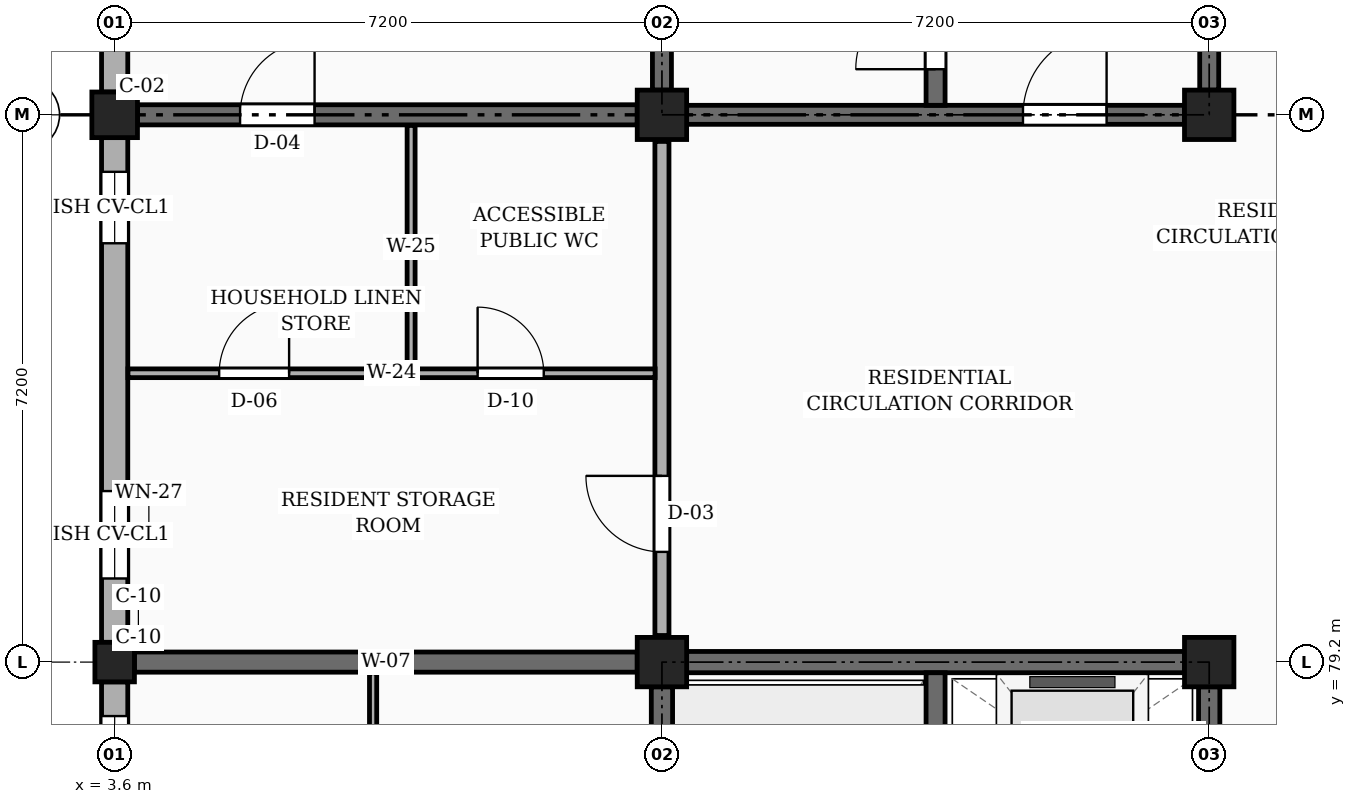
"""IFC4 building model, lengths in metres.
Left out: names, types, materials, properties, quantities, classifications, styles, units other than length and angle.
Written with IfcOpenShell. Run it as: python <this file> out.ifc"""

import sys

from ifc_helpers import new_model, si_unit, direction, frame, frame_2d, origin, origin_2d, place, context, subcontext, project, spatial, rectangle, circle, extrude, element, fill, save


model = new_model("IFC4")
c1 = context("Model", 3, precision=1e-05, world=origin(), true_north=direction((0.0, 1.0)))
c2 = subcontext(c1, "Body", "Model", "MODEL_VIEW")
j1 = project(units=[si_unit("LENGTHUNIT", "METRE"), si_unit("PLANEANGLEUNIT", "RADIAN")], contexts=[c1])
p1 = place(None, origin())
s1 = spatial("IfcSite", under=j1, at=p1, CompositionType="ELEMENT")
p2 = place(p1, origin())
s2 = spatial("IfcBuilding", under=s1, at=p2, CompositionType="ELEMENT")
p3 = place(p2, origin())
s3 = spatial("IfcBuildingStorey", under=s2, at=p3, CompositionType="ELEMENT", Elevation=0.0)
p4 = place(p3, frame((3.6, 79.2, 0.0), z_axis=(0.0, 0.0, 1.0), x_axis=(1.0, 0.0, 0.0)))
e1 = element("IfcColumn", 1, at=p4, inside=s3, PredefinedType="COLUMN", context=c2, shape_type="SweptSolid", body=[
    extrude(circle(Radius=0.26, at=origin_2d()), origin(), (0.0, 0.0, 1.0), 4.5),
])
p5 = place(p3, frame((3.6, 86.4, 0.0), z_axis=(0.0, 0.0, 1.0), x_axis=(1.0, 0.0, 0.0)))
e2 = element("IfcColumn", 2, at=p5, inside=s3, PredefinedType="COLUMN", context=c2, shape_type="SweptSolid", body=[
    extrude(rectangle(XDim=0.6, YDim=0.6, at=origin_2d()), origin(), (0.0, 0.0, 1.0), 4.5),
])
for number, where, z_axis, x_axis in (
    (3, (10.8, 79.2, 0.0), (0.0, 0.0, 1.0), (1.0, 0.0, 0.0)),
    (4, (10.8, 86.4, 0.0), (0.0, 0.0, 1.0), (1.0, 0.0, 0.0)),
    (5, (18.0, 79.2, 0.0), (0.0, 0.0, 1.0), (1.0, 0.0, 0.0)),
    (6, (18.0, 86.4, 0.0), (0.0, 0.0, 1.0), (1.0, 0.0, 0.0)),
):
    element("IfcColumn", number, at=place(p3, frame(where, z_axis=z_axis, x_axis=x_axis)), inside=s3, PredefinedType="COLUMN", context=c2, shape_type="SweptSolid", body=[
        extrude(rectangle(XDim=0.65, YDim=0.65, at=origin_2d()), origin(), (0.0, 0.0, 1.0), 4.5),
    ])
p6 = place(p3, frame((3.86, 79.2, 0.0), z_axis=(0.0, 0.0, 1.0), x_axis=(1.0, 0.0, 0.0)))
e7 = element("IfcWall", 7, at=p6, inside=s3, PredefinedType="SOLIDWALL", context=c2, shape_type="SweptSolid", body=[
    extrude(rectangle(XDim=6.615, YDim=0.265, at=frame_2d((3.308, 0.0))), origin(), (0.0, 0.0, 1.0), 3.56),
])
p7 = place(p3, frame((3.9, 86.4, 0.0), z_axis=(0.0, 0.0, 1.0), x_axis=(1.0, 0.0, 0.0)))
e8 = element("IfcWall", 8, at=p7, inside=s3, PredefinedType="SOLIDWALL", context=c2, shape_type="SweptSolid", body=[
    extrude(rectangle(XDim=6.575, YDim=0.265, at=frame_2d((3.288, 0.0))), origin(), (0.0, 0.0, 1.0), 3.56),
])
p8 = place(p7, frame((1.35, 0.0, 0.0)))
e9 = element("IfcOpeningElement", 9, at=p8, cuts=e8, PredefinedType="OPENING", context=c2, shape_type="SweptSolid", body=[
    extrude(rectangle(XDim=0.98, YDim=2.12, at=frame_2d((0.49, 1.06))), frame((0.0, 0.143, 0.0), z_axis=(0.0, -1.0, 0.0), x_axis=(1.0, 0.0, 0.0)), (0.0, 0.0, 1.0), 0.285),
])
p9 = place(p3, frame((3.6, 93.3, 0.0), z_axis=(0.0, 0.0, 1.0), x_axis=(0.0, -1.0, 0.0)))
e10 = element("IfcWall", 10, at=p9, inside=s3, PredefinedType="SOLIDWALL", context=c2, shape_type="SweptSolid", body=[
    extrude(rectangle(XDim=6.6, YDim=0.345, at=frame_2d((3.3, 0.0))), origin(), (0.0, 0.0, 1.0), 3.83),
])
p10 = place(p9, frame((0.45, 0.0, 0.78)))
e11 = element("IfcOpeningElement", 11, at=p10, cuts=e10, PredefinedType="OPENING", context=c2, shape_type="SweptSolid", body=[
    extrude(rectangle(XDim=1.38, YDim=1.36, at=frame_2d((0.69, 0.68))), frame((0.0, 0.183, 0.0), z_axis=(0.0, -1.0, 0.0), x_axis=(1.0, 0.0, 0.0)), (0.0, 0.0, 1.0), 0.365),
])
p11 = place(p9, frame((4.65, 0.0, 0.78)))
e12 = element("IfcOpeningElement", 12, at=p11, cuts=e10, PredefinedType="OPENING", context=c2, shape_type="SweptSolid", body=[
    extrude(rectangle(XDim=0.94, YDim=1.44, at=frame_2d((0.47, 0.72))), frame((0.0, 0.183, 0.0), z_axis=(0.0, -1.0, 0.0), x_axis=(1.0, 0.0, 0.0)), (0.0, 0.0, 1.0), 0.365),
])
p12 = place(p3, frame((3.6, 86.1, 0.0), z_axis=(0.0, 0.0, 1.0), x_axis=(0.0, -1.0, 0.0)))
e13 = element("IfcWall", 13, at=p12, inside=s3, PredefinedType="SOLIDWALL", context=c2, shape_type="SweptSolid", body=[
    extrude(rectangle(XDim=6.64, YDim=0.345, at=frame_2d((3.32, 0.0))), origin(), (0.0, 0.0, 1.0), 3.83),
])
p13 = place(p12, frame((0.45, 0.0, 0.78)))
e14 = element("IfcOpeningElement", 14, at=p13, cuts=e13, PredefinedType="OPENING", context=c2, shape_type="SweptSolid", body=[
    extrude(rectangle(XDim=0.94, YDim=1.44, at=frame_2d((0.47, 0.72))), frame((0.0, 0.183, 0.0), z_axis=(0.0, -1.0, 0.0), x_axis=(1.0, 0.0, 0.0)), (0.0, 0.0, 1.0), 0.365),
])
p14 = place(p12, frame((4.65, 0.0, 0.78)))
e15 = element("IfcOpeningElement", 15, at=p14, cuts=e13, PredefinedType="OPENING", context=c2, shape_type="SweptSolid", body=[
    extrude(rectangle(XDim=1.15, YDim=1.44, at=frame_2d((0.575, 0.72))), frame((0.0, 0.183, 0.0), z_axis=(0.0, -1.0, 0.0), x_axis=(1.0, 0.0, 0.0)), (0.0, 0.0, 1.0), 0.365),
])
p15 = place(p3, frame((3.6, 78.94, 0.0), z_axis=(0.0, 0.0, 1.0), x_axis=(0.0, -1.0, 0.0)))
e16 = element("IfcWall", 16, at=p15, inside=s3, PredefinedType="SOLIDWALL", context=c2, shape_type="SweptSolid", body=[
    extrude(rectangle(XDim=6.64, YDim=0.345, at=frame_2d((3.32, 0.0))), origin(), (0.0, 0.0, 1.0), 3.83),
])
p16 = place(p15, frame((0.45, 0.0, 0.78)))
e17 = element("IfcOpeningElement", 17, at=p16, cuts=e16, PredefinedType="OPENING", context=c2, shape_type="SweptSolid", body=[
    extrude(rectangle(XDim=1.15, YDim=1.44, at=frame_2d((0.575, 0.72))), frame((0.0, 0.183, 0.0), z_axis=(0.0, -1.0, 0.0), x_axis=(1.0, 0.0, 0.0)), (0.0, 0.0, 1.0), 0.365),
])
p17 = place(p15, frame((4.65, 0.0, 0.78)))
e18 = element("IfcOpeningElement", 18, at=p17, cuts=e16, PredefinedType="OPENING", context=c2, shape_type="SweptSolid", body=[
    extrude(rectangle(XDim=1.35, YDim=1.44, at=frame_2d((0.675, 0.72))), frame((0.0, 0.183, 0.0), z_axis=(0.0, -1.0, 0.0), x_axis=(1.0, 0.0, 0.0)), (0.0, 0.0, 1.0), 0.365),
])
for number, where, z_axis, x_axis in (
    (19, (10.8, 72.325, 0.0), (0.0, 0.0, 1.0), (0.0, 1.0, 0.0)),
    (20, (11.125, 79.2, 0.0), (0.0, 0.0, 1.0), (1.0, 0.0, 0.0)),
):
    element("IfcWall", number, at=place(p3, frame(where, z_axis=z_axis, x_axis=x_axis)), inside=s3, PredefinedType="SHEAR", context=c2, shape_type="SweptSolid", body=[
        extrude(rectangle(XDim=6.55, YDim=0.28, at=frame_2d((3.275, 0.0))), origin(), (0.0, 0.0, 1.0), 4.26),
    ])
p18 = place(p3, frame((18.0, 72.325, 0.0), z_axis=(0.0, 0.0, 1.0), x_axis=(0.0, 1.0, 0.0)))
e21 = element("IfcWall", 21, at=p18, inside=s3, PredefinedType="SHEAR", context=c2, shape_type="SweptSolid", body=[
    extrude(rectangle(XDim=6.55, YDim=0.28, at=frame_2d((3.275, 0.0))), origin(), (0.0, 0.0, 1.0), 4.26),
])
p19 = place(p18, frame((1.5, 0.0, 0.0)))
e22 = element("IfcOpeningElement", 22, at=p19, cuts=e21, PredefinedType="OPENING", context=c2, shape_type="SweptSolid", body=[
    extrude(rectangle(XDim=1.1, YDim=2.15, at=frame_2d((0.55, 1.075))), frame((0.0, 0.15, 0.0), z_axis=(0.0, -1.0, 0.0), x_axis=(1.0, 0.0, 0.0)), (0.0, 0.0, 1.0), 0.3),
])
p20 = place(p3, frame((14.4, 72.14, 0.0), z_axis=(0.0, 0.0, 1.0), x_axis=(0.0, 1.0, 0.0)))
e23 = element("IfcWall", 23, at=p20, inside=s3, PredefinedType="SHEAR", context=c2, shape_type="SweptSolid", body=[
    extrude(rectangle(XDim=6.92, YDim=0.25, at=frame_2d((3.46, 0.0))), origin(), (0.0, 0.0, 1.0), 4.26),
])
p21 = place(p20, frame((0.46, 0.0, 0.0)))
e24 = element("IfcOpeningElement", 24, at=p21, cuts=e23, PredefinedType="OPENING", context=c2, shape_type="SweptSolid", body=[
    extrude(rectangle(XDim=1.05, YDim=2.15, at=frame_2d((0.525, 1.075))), frame((0.0, 0.135, 0.0), z_axis=(0.0, -1.0, 0.0), x_axis=(1.0, 0.0, 0.0)), (0.0, 0.0, 1.0), 0.27),
])
p22 = place(p3, frame((10.8, 86.725, 0.0), z_axis=(0.0, 0.0, 1.0), x_axis=(0.0, 1.0, 0.0)))
e25 = element("IfcWall", 25, at=p22, inside=s3, PredefinedType="SHEAR", context=c2, shape_type="SweptSolid", body=[
    extrude(rectangle(XDim=6.55, YDim=0.25, at=frame_2d((3.275, 0.0))), origin(), (0.0, 0.0, 1.0), 4.26),
])
p23 = place(p3, frame((18.0, 86.725, 0.0), z_axis=(0.0, 0.0, 1.0), x_axis=(0.0, 1.0, 0.0)))
e26 = element("IfcWall", 26, at=p23, inside=s3, PredefinedType="SHEAR", context=c2, shape_type="SweptSolid", body=[
    extrude(rectangle(XDim=6.55, YDim=0.25, at=frame_2d((3.275, 0.0))), origin(), (0.0, 0.0, 1.0), 4.26),
])
p24 = place(p23, frame((1.5, 0.0, 0.0)))
e27 = element("IfcOpeningElement", 27, at=p24, cuts=e26, PredefinedType="OPENING", context=c2, shape_type="SweptSolid", body=[
    extrude(rectangle(XDim=1.1, YDim=2.15, at=frame_2d((0.55, 1.075))), frame((0.0, 0.135, 0.0), z_axis=(0.0, -1.0, 0.0), x_axis=(1.0, 0.0, 0.0)), (0.0, 0.0, 1.0), 0.27),
])
p25 = place(p3, frame((11.125, 86.4, 0.0), z_axis=(0.0, 0.0, 1.0), x_axis=(1.0, 0.0, 0.0)))
e28 = element("IfcWall", 28, at=p25, inside=s3, PredefinedType="SHEAR", context=c2, shape_type="SweptSolid", body=[
    extrude(rectangle(XDim=6.55, YDim=0.25, at=frame_2d((3.275, 0.0))), origin(), (0.0, 0.0, 1.0), 4.26),
])
p26 = place(p25, frame((4.425, 0.0, 0.0)))
e29 = element("IfcOpeningElement", 29, at=p26, cuts=e28, PredefinedType="OPENING", context=c2, shape_type="SweptSolid", body=[
    extrude(rectangle(XDim=1.1, YDim=2.15, at=frame_2d((0.55, 1.075))), frame((0.0, 0.135, 0.0), z_axis=(0.0, -1.0, 0.0), x_axis=(1.0, 0.0, 0.0)), (0.0, 0.0, 1.0), 0.27),
])
p27 = place(p3, frame((14.4, 86.525, 0.0), z_axis=(0.0, 0.0, 1.0), x_axis=(0.0, 1.0, 0.0)))
e30 = element("IfcWall", 30, at=p27, inside=s3, PredefinedType="SHEAR", context=c2, shape_type="SweptSolid", body=[
    extrude(rectangle(XDim=6.95, YDim=0.25, at=frame_2d((3.475, 0.0))), origin(), (0.0, 0.0, 1.0), 4.26),
])
p28 = place(p27, frame((0.475, 0.0, 0.0)))
e31 = element("IfcOpeningElement", 31, at=p28, cuts=e30, PredefinedType="OPENING", context=c2, shape_type="SweptSolid", body=[
    extrude(rectangle(XDim=1.05, YDim=2.15, at=frame_2d((0.525, 1.075))), frame((0.0, 0.135, 0.0), z_axis=(0.0, -1.0, 0.0), x_axis=(1.0, 0.0, 0.0)), (0.0, 0.0, 1.0), 0.27),
])
p29 = place(p3, frame((10.8, 79.55, 0.0), z_axis=(0.0, 0.0, 1.0), x_axis=(0.0, 1.0, 0.0)))
e32 = element("IfcWall", 32, at=p29, inside=s3, PredefinedType="PARTITIONING", context=c2, shape_type="SweptSolid", body=[
    extrude(rectangle(XDim=6.5, YDim=0.185, at=frame_2d((3.25, 0.0))), origin(), (0.0, 0.0, 1.0), 3.51),
])
p30 = place(p29, frame((1.1, 0.0, 0.0)))
e33 = element("IfcOpeningElement", 33, at=p30, cuts=e32, PredefinedType="OPENING", context=c2, shape_type="SweptSolid", body=[
    extrude(rectangle(XDim=1.0, YDim=2.15, at=frame_2d((0.5, 1.075))), frame((0.0, 0.103, 0.0), z_axis=(0.0, -1.0, 0.0), x_axis=(1.0, 0.0, 0.0)), (0.0, 0.0, 1.0), 0.205),
])
p31 = place(p3, frame((7.0, 75.37, 0.0), z_axis=(0.0, 0.0, 1.0), x_axis=(0.0, 1.0, 0.0)))
e34 = element("IfcWall", 34, at=p31, inside=s3, PredefinedType="PARTITIONING", context=c2, shape_type="SweptSolid", body=[
    extrude(rectangle(XDim=3.69, YDim=0.095, at=frame_2d((1.845, 0.0))), origin(), (0.0, 0.0, 1.0), 3.695),
])
p32 = place(p3, frame((3.775, 83.0, 0.0), z_axis=(0.0, 0.0, 1.0), x_axis=(1.0, 0.0, 0.0)))
e35 = element("IfcWall", 35, at=p32, inside=s3, PredefinedType="PARTITIONING", context=c2, shape_type="SweptSolid", body=[
    extrude(rectangle(XDim=6.935, YDim=0.115, at=frame_2d((3.468, 0.0))), origin(), (0.0, 0.0, 1.0), 3.695),
])
p33 = place(p32, frame((4.6, 0.0, 0.0)))
e36 = element("IfcOpeningElement", 36, at=p33, cuts=e35, PredefinedType="OPENING", context=c2, shape_type="SweptSolid", body=[
    extrude(rectangle(XDim=0.87, YDim=2.05, at=frame_2d((0.435, 1.025))), frame((0.0, 0.067, 0.0), z_axis=(0.0, -1.0, 0.0), x_axis=(1.0, 0.0, 0.0)), (0.0, 0.0, 1.0), 0.135),
])
p34 = place(p32, frame((1.2, 0.0, 0.0)))
e37 = element("IfcOpeningElement", 37, at=p34, cuts=e35, PredefinedType="OPENING", context=c2, shape_type="SweptSolid", body=[
    extrude(rectangle(XDim=0.92, YDim=2.1, at=frame_2d((0.46, 1.05))), frame((0.0, 0.067, 0.0), z_axis=(0.0, -1.0, 0.0), x_axis=(1.0, 0.0, 0.0)), (0.0, 0.0, 1.0), 0.135),
])
p35 = place(p3, frame((7.5, 83.07, 0.0), z_axis=(0.0, 0.0, 1.0), x_axis=(0.0, 1.0, 0.0)))
e38 = element("IfcWall", 38, at=p35, inside=s3, PredefinedType="PARTITIONING", context=c2, shape_type="SweptSolid", body=[
    extrude(rectangle(XDim=3.19, YDim=0.105, at=frame_2d((1.595, 0.0))), origin(), (0.0, 0.0, 1.0), 3.695),
])
p36 = place(p13, origin())
e39 = element("IfcWindow", 39, at=p36, inside=s3, PartitioningType="SINGLE_PANEL", PredefinedType="WINDOW", context=c2, shape_type="SweptSolid", body=[
    extrude(rectangle(XDim=0.94, YDim=1.44, at=frame_2d((0.47, 0.72))), frame((0.0, 0.03, 0.0), z_axis=(0.0, -1.0, 0.0), x_axis=(1.0, 0.0, 0.0)), (0.0, 0.0, 1.0), 0.06),
])
fill(e14, e39)
p37 = place(p14, origin())
e40 = element("IfcWindow", 40, at=p37, inside=s3, PartitioningType="SINGLE_PANEL", PredefinedType="WINDOW", context=c2, shape_type="SweptSolid", body=[
    extrude(rectangle(XDim=1.15, YDim=1.44, at=frame_2d((0.575, 0.72))), frame((0.0, 0.03, 0.0), z_axis=(0.0, -1.0, 0.0), x_axis=(1.0, 0.0, 0.0)), (0.0, 0.0, 1.0), 0.06),
])
fill(e15, e40)
p38 = place(p16, origin())
e41 = element("IfcWindow", 41, at=p38, inside=s3, PartitioningType="SINGLE_PANEL", PredefinedType="WINDOW", context=c2, shape_type="SweptSolid", body=[
    extrude(rectangle(XDim=1.15, YDim=1.44, at=frame_2d((0.575, 0.72))), frame((0.0, 0.03, 0.0), z_axis=(0.0, -1.0, 0.0), x_axis=(1.0, 0.0, 0.0)), (0.0, 0.0, 1.0), 0.06),
])
fill(e17, e41)
p39 = place(p26, frame((1.1, 0.0, 0.0), z_axis=(0.0, 0.0, 1.0), x_axis=(-1.0, 0.0, 0.0)))
e42 = element("IfcDoor", 42, at=p39, inside=s3, OperationType="SINGLE_SWING_RIGHT", PredefinedType="DOOR", context=c2, shape_type="SweptSolid", body=[
    extrude(rectangle(XDim=1.1, YDim=2.15, at=frame_2d((0.55, 1.075))), frame((0.0, 0.025, 0.0), z_axis=(0.0, -1.0, 0.0), x_axis=(1.0, 0.0, 0.0)), (0.0, 0.0, 1.0), 0.05),
])
fill(e29, e42)
p40 = place(p28, frame((1.05, 0.0, 0.0), z_axis=(0.0, 0.0, 1.0), x_axis=(-1.0, 0.0, 0.0)))
e43 = element("IfcDoor", 43, at=p40, inside=s3, OperationType="SINGLE_SWING_LEFT", PredefinedType="DOOR", context=c2, shape_type="SweptSolid", body=[
    extrude(rectangle(XDim=1.05, YDim=2.15, at=frame_2d((0.525, 1.075))), frame((0.0, 0.025, 0.0), z_axis=(0.0, -1.0, 0.0), x_axis=(1.0, 0.0, 0.0)), (0.0, 0.0, 1.0), 0.05),
])
fill(e31, e43)
p41 = place(p30, origin())
e44 = element("IfcDoor", 44, at=p41, inside=s3, OperationType="SINGLE_SWING_RIGHT", PredefinedType="DOOR", context=c2, shape_type="SweptSolid", body=[
    extrude(rectangle(XDim=1.0, YDim=2.15, at=frame_2d((0.5, 1.075))), frame((0.0, 0.025, 0.0), z_axis=(0.0, -1.0, 0.0), x_axis=(1.0, 0.0, 0.0)), (0.0, 0.0, 1.0), 0.05),
])
fill(e33, e44)
p42 = place(p33, origin())
e45 = element("IfcDoor", 45, at=p42, inside=s3, OperationType="SINGLE_SWING_LEFT", PredefinedType="DOOR", context=c2, shape_type="SweptSolid", body=[
    extrude(rectangle(XDim=0.87, YDim=2.05, at=frame_2d((0.435, 1.025))), frame((0.0, 0.025, 0.0), z_axis=(0.0, -1.0, 0.0), x_axis=(1.0, 0.0, 0.0)), (0.0, 0.0, 1.0), 0.05),
])
fill(e36, e45)
p43 = place(p34, origin())
e46 = element("IfcDoor", 46, at=p43, inside=s3, OperationType="SINGLE_SWING_RIGHT", PredefinedType="DOOR", context=c2, shape_type="SweptSolid", body=[
    extrude(rectangle(XDim=0.92, YDim=2.1, at=frame_2d((0.46, 1.05))), frame((0.0, 0.025, 0.0), z_axis=(0.0, -1.0, 0.0), x_axis=(1.0, 0.0, 0.0)), (0.0, 0.0, 1.0), 0.05),
])
fill(e37, e46)
p44 = place(p8, origin())
e47 = element("IfcDoor", 47, at=p44, inside=s3, OperationType="SINGLE_SWING_RIGHT", PredefinedType="DOOR", context=c2, shape_type="SweptSolid", body=[
    extrude(rectangle(XDim=0.98, YDim=2.12, at=frame_2d((0.49, 1.06))), frame((0.0, 0.025, 0.0), z_axis=(0.0, -1.0, 0.0), x_axis=(1.0, 0.0, 0.0)), (0.0, 0.0, 1.0), 0.05),
])
fill(e9, e47)
save(model, sys.argv[1])
